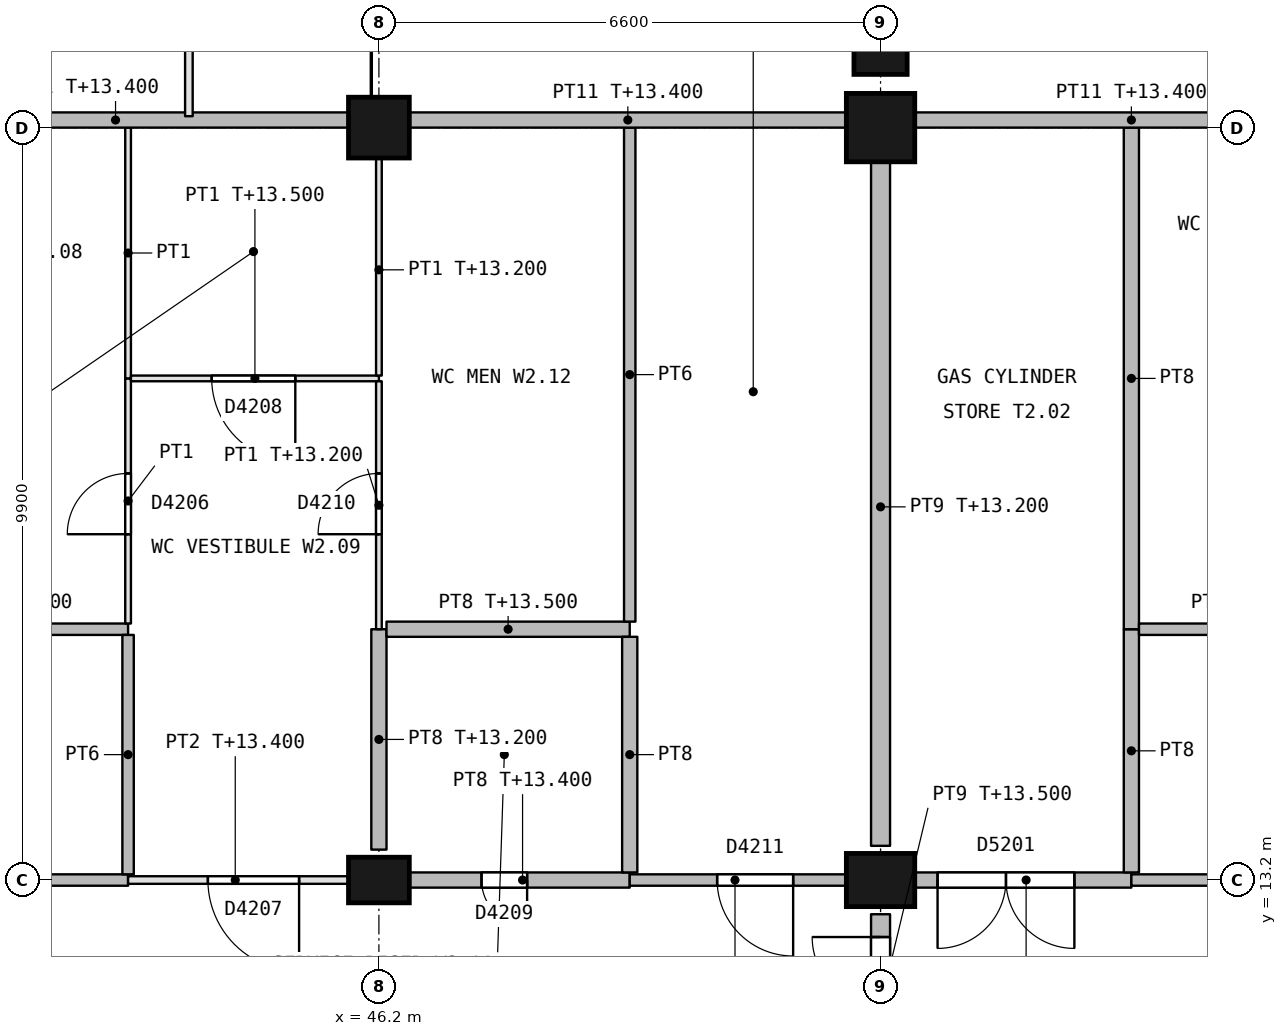
"""IFC4 building model, lengths in metres.
Left out: names, types, materials, properties, quantities, classifications, styles, units other than length and angle.
Written with IfcOpenShell. Run it as: python <this file> out.ifc"""

import sys

from ifc_helpers import new_model, si_unit, direction, frame, frame_2d, origin, origin_2d, place, context, subcontext, project, spatial, rectangle, extrude, element, fill, save


model = new_model("IFC4")
c1 = context("Model", 3, precision=1e-05, world=origin(), true_north=direction((0.0, 1.0)))
c2 = subcontext(c1, "Body", "Model", "MODEL_VIEW")
j1 = project(units=[si_unit("LENGTHUNIT", "METRE"), si_unit("PLANEANGLEUNIT", "RADIAN")], contexts=[c1])
p1 = place(None, origin())
s1 = spatial("IfcSite", under=j1, at=p1, CompositionType="ELEMENT")
p2 = place(p1, origin())
s2 = spatial("IfcBuilding", under=s1, at=p2, CompositionType="ELEMENT")
p3 = place(p2, frame((0.0, 0.0, 9.9)))
s3 = spatial("IfcBuildingStorey", under=s2, at=p3, CompositionType="ELEMENT", Elevation=9.9)
p4 = place(p3, frame((46.2, 13.2, 0.0), z_axis=(0.0, 0.0, 1.0), x_axis=(1.0, 0.0, 0.0)))
e1 = element("IfcColumn", 1, at=p4, inside=s3, PredefinedType="COLUMN", context=c2, shape_type="SweptSolid", body=[
    extrude(rectangle(XDim=0.8, YDim=0.6, at=origin_2d()), origin(), (0.0, 0.0, 1.0), 4.5),
])
p5 = place(p3, frame((46.2, 23.1, 0.0), z_axis=(0.0, 0.0, 1.0), x_axis=(1.0, 0.0, 0.0)))
e2 = element("IfcColumn", 2, at=p5, inside=s3, PredefinedType="COLUMN", context=c2, shape_type="SweptSolid", body=[
    extrude(rectangle(XDim=0.8, YDim=0.8, at=origin_2d()), origin(), (0.0, 0.0, 1.0), 4.5),
])
p6 = place(p3, frame((52.8, 13.2, 0.0), z_axis=(0.0, 0.0, 1.0), x_axis=(1.0, 0.0, 0.0)))
e3 = element("IfcColumn", 3, at=p6, inside=s3, PredefinedType="COLUMN", context=c2, shape_type="SweptSolid", body=[
    extrude(rectangle(XDim=0.9, YDim=0.7, at=origin_2d()), origin(), (0.0, 0.0, 1.0), 4.5),
])
p7 = place(p3, frame((52.8, 23.1, 0.0), z_axis=(0.0, 0.0, 1.0), x_axis=(1.0, 0.0, 0.0)))
e4 = element("IfcColumn", 4, at=p7, inside=s3, PredefinedType="COLUMN", context=c2, shape_type="SweptSolid", body=[
    extrude(rectangle(XDim=0.9, YDim=0.9, at=origin_2d()), origin(), (0.0, 0.0, 1.0), 4.5),
])
p8 = place(p3, frame((52.8, 24.15, 0.0), z_axis=(0.0, 0.0, 1.0), x_axis=(1.0, 0.0, 0.0)))
e5 = element("IfcColumn", 5, at=p8, inside=s3, PredefinedType="COLUMN", context=c2, shape_type="SweptSolid", body=[
    extrude(rectangle(XDim=0.7, YDim=0.7, at=origin_2d()), origin(), (0.0, 0.0, 1.0), 4.5),
])
p9 = place(p3, frame((42.9, 13.2, 0.0), z_axis=(0.0, 0.0, 1.0), x_axis=(-1.0, 0.0, 0.0)))
e6 = element("IfcWall", 6, at=p9, inside=s3, PredefinedType="PARTITIONING", context=c2, shape_type="SweptSolid", body=[
    extrude(rectangle(XDim=3.3, YDim=0.15, at=frame_2d((1.65, 0.0))), origin(), (0.0, 0.0, 1.0), 3.5),
])
p10 = place(p9, frame((1.2, 0.0, 0.0)))
e7 = element("IfcOpeningElement", 7, at=p10, cuts=e6, PredefinedType="OPENING", context=c2, shape_type="SweptSolid", body=[
    extrude(rectangle(XDim=0.9, YDim=2.1, at=frame_2d((0.45, 1.05))), frame((0.0, 0.085, 0.0), z_axis=(0.0, -1.0, 0.0), x_axis=(1.0, 0.0, 0.0)), (0.0, 0.0, 1.0), 0.17),
])
p11 = place(p3, frame((42.9, 13.2, 0.0), z_axis=(0.0, 0.0, 1.0), x_axis=(1.0, 0.0, 0.0)))
e8 = element("IfcWall", 8, at=p11, inside=s3, PredefinedType="PARTITIONING", context=c2, shape_type="SweptSolid", body=[
    extrude(rectangle(XDim=2.9, YDim=0.1, at=frame_2d((1.45, 0.0))), origin(), (0.0, 0.0, 1.0), 3.5),
])
p12 = place(p11, frame((1.05, 0.0, 0.0)))
e9 = element("IfcOpeningElement", 9, at=p12, cuts=e8, PredefinedType="OPENING", context=c2, shape_type="SweptSolid", body=[
    extrude(rectangle(XDim=1.2, YDim=2.1, at=frame_2d((0.6, 1.05))), frame((0.0, 0.06, 0.0), z_axis=(0.0, -1.0, 0.0), x_axis=(1.0, 0.0, 0.0)), (0.0, 0.0, 1.0), 0.12),
])
p13 = place(p3, frame((46.6, 13.2, 0.0), z_axis=(0.0, 0.0, 1.0), x_axis=(1.0, 0.0, 0.0)))
e10 = element("IfcWall", 10, at=p13, inside=s3, PredefinedType="PARTITIONING", context=c2, shape_type="SweptSolid", body=[
    extrude(rectangle(XDim=2.9, YDim=0.2, at=frame_2d((1.45, 0.0))), origin(), (0.0, 0.0, 1.0), 3.5),
])
p14 = place(p13, frame((0.95, 0.0, 0.0)))
e11 = element("IfcOpeningElement", 11, at=p14, cuts=e10, PredefinedType="OPENING", context=c2, shape_type="SweptSolid", body=[
    extrude(rectangle(XDim=0.6, YDim=2.1, at=frame_2d((0.3, 1.05))), frame((0.0, 0.11, 0.0), z_axis=(0.0, -1.0, 0.0), x_axis=(1.0, 0.0, 0.0)), (0.0, 0.0, 1.0), 0.22),
])
p15 = place(p3, frame((52.35, 13.2, 0.0), z_axis=(0.0, 0.0, 1.0), x_axis=(-1.0, 0.0, 0.0)))
e12 = element("IfcWall", 12, at=p15, inside=s3, PredefinedType="PARTITIONING", context=c2, shape_type="SweptSolid", body=[
    extrude(rectangle(XDim=2.85, YDim=0.15, at=frame_2d((1.425, 0.0))), origin(), (0.0, 0.0, 1.0), 3.5),
])
p16 = place(p15, frame((0.7, 0.0, 0.0)))
e13 = element("IfcOpeningElement", 13, at=p16, cuts=e12, PredefinedType="OPENING", context=c2, shape_type="SweptSolid", body=[
    extrude(rectangle(XDim=1.0, YDim=2.1, at=frame_2d((0.5, 1.05))), frame((0.0, 0.085, 0.0), z_axis=(0.0, -1.0, 0.0), x_axis=(1.0, 0.0, 0.0)), (0.0, 0.0, 1.0), 0.17),
])
p17 = place(p3, frame((52.8, 10.35, 0.0), z_axis=(0.0, 0.0, 1.0), x_axis=(0.0, 1.0, 0.0)))
e14 = element("IfcWall", 14, at=p17, inside=s3, PredefinedType="PARTITIONING", context=c2, shape_type="SweptSolid", body=[
    extrude(rectangle(XDim=2.4, YDim=0.25, at=frame_2d((1.2, 0.0))), origin(), (0.0, 0.0, 1.0), 3.6),
])
p18 = place(p17, frame((0.3, 0.0, 0.0)))
e15 = element("IfcOpeningElement", 15, at=p18, cuts=e14, PredefinedType="OPENING", context=c2, shape_type="SweptSolid", body=[
    extrude(rectangle(XDim=1.8, YDim=2.1, at=frame_2d((0.9, 1.05))), frame((0.0, 0.135, 0.0), z_axis=(0.0, -1.0, 0.0), x_axis=(1.0, 0.0, 0.0)), (0.0, 0.0, 1.0), 0.27),
])
p19 = place(p3, frame((42.9, 16.5, 0.0), z_axis=(0.0, 0.0, 1.0), x_axis=(-1.0, 0.0, 0.0)))
e16 = element("IfcWall", 16, at=p19, inside=s3, PredefinedType="PARTITIONING", context=c2, shape_type="SweptSolid", body=[
    extrude(rectangle(XDim=3.3, YDim=0.15, at=frame_2d((1.65, 0.0))), origin(), (0.0, 0.0, 1.0), 3.6),
])
p20 = place(p3, frame((42.9, 13.275, 0.0), z_axis=(0.0, 0.0, 1.0), x_axis=(0.0, 1.0, 0.0)))
e17 = element("IfcWall", 17, at=p20, inside=s3, PredefinedType="PARTITIONING", context=c2, shape_type="SweptSolid", body=[
    extrude(rectangle(XDim=3.15, YDim=0.15, at=frame_2d((1.575, 0.0))), origin(), (0.0, 0.0, 1.0), 4.2),
])
p21 = place(p3, frame((42.9, 16.575, 0.0), z_axis=(0.0, 0.0, 1.0), x_axis=(0.0, 1.0, 0.0)))
e18 = element("IfcWall", 18, at=p21, inside=s3, PredefinedType="PARTITIONING", context=c2, shape_type="SweptSolid", body=[
    extrude(rectangle(XDim=3.225, YDim=0.075, at=frame_2d((1.613, 0.0))), origin(), (0.0, 0.0, 1.0), 4.2),
])
p22 = place(p21, frame((1.175, 0.0, 0.0)))
e19 = element("IfcOpeningElement", 19, at=p22, cuts=e18, PredefinedType="OPENING", context=c2, shape_type="SweptSolid", body=[
    extrude(rectangle(XDim=0.8, YDim=2.1, at=frame_2d((0.4, 1.05))), frame((0.0, 0.047, 0.0), z_axis=(0.0, -1.0, 0.0), x_axis=(1.0, 0.0, 0.0)), (0.0, 0.0, 1.0), 0.095),
])
p23 = place(p3, frame((42.9, 19.8, 0.0), z_axis=(0.0, 0.0, 1.0), x_axis=(0.0, 1.0, 0.0)))
e20 = element("IfcWall", 20, at=p23, inside=s3, PredefinedType="PARTITIONING", context=c2, shape_type="SweptSolid", body=[
    extrude(rectangle(XDim=3.3, YDim=0.075, at=frame_2d((1.65, 0.0))), origin(), (0.0, 0.0, 1.0), 4.2),
])
p24 = place(p3, frame((42.938, 19.8, 0.0), z_axis=(0.0, 0.0, 1.0), x_axis=(1.0, 0.0, 0.0)))
e21 = element("IfcWall", 21, at=p24, inside=s3, PredefinedType="PARTITIONING", context=c2, shape_type="SweptSolid", body=[
    extrude(rectangle(XDim=3.262, YDim=0.075, at=frame_2d((1.631, 0.0))), origin(), (0.0, 0.0, 1.0), 3.6),
])
p25 = place(p24, frame((1.062, 0.0, 0.0)))
e22 = element("IfcOpeningElement", 22, at=p25, cuts=e21, PredefinedType="OPENING", context=c2, shape_type="SweptSolid", body=[
    extrude(rectangle(XDim=1.1, YDim=2.1, at=frame_2d((0.55, 1.05))), frame((0.0, 0.047, 0.0), z_axis=(0.0, -1.0, 0.0), x_axis=(1.0, 0.0, 0.0)), (0.0, 0.0, 1.0), 0.095),
])
p26 = place(p3, frame((46.2, 13.6, 0.0), z_axis=(0.0, 0.0, 1.0), x_axis=(0.0, 1.0, 0.0)))
e23 = element("IfcWall", 23, at=p26, inside=s3, PredefinedType="PARTITIONING", context=c2, shape_type="SweptSolid", body=[
    extrude(rectangle(XDim=2.9, YDim=0.2, at=frame_2d((1.45, 0.0))), origin(), (0.0, 0.0, 1.0), 3.3),
])
p27 = place(p3, frame((46.2, 19.762, 0.0), z_axis=(0.0, 0.0, 1.0), x_axis=(0.0, -1.0, 0.0)))
e24 = element("IfcWall", 24, at=p27, inside=s3, PredefinedType="PARTITIONING", context=c2, shape_type="SweptSolid", body=[
    extrude(rectangle(XDim=3.262, YDim=0.075, at=frame_2d((1.631, 0.0))), origin(), (0.0, 0.0, 1.0), 3.3),
])
p28 = place(p27, frame((1.212, 0.0, 0.0)))
e25 = element("IfcOpeningElement", 25, at=p28, cuts=e24, PredefinedType="OPENING", context=c2, shape_type="SweptSolid", body=[
    extrude(rectangle(XDim=0.8, YDim=2.1, at=frame_2d((0.4, 1.05))), frame((0.0, 0.047, 0.0), z_axis=(0.0, -1.0, 0.0), x_axis=(1.0, 0.0, 0.0)), (0.0, 0.0, 1.0), 0.095),
])
p29 = place(p3, frame((46.2, 19.837, 0.0), z_axis=(0.0, 0.0, 1.0), x_axis=(0.0, 1.0, 0.0)))
e26 = element("IfcWall", 26, at=p29, inside=s3, PredefinedType="PARTITIONING", context=c2, shape_type="SweptSolid", body=[
    extrude(rectangle(XDim=2.863, YDim=0.075, at=frame_2d((1.431, 0.0))), origin(), (0.0, 0.0, 1.0), 3.3),
])
p30 = place(p3, frame((49.5, 16.5, 0.0), z_axis=(0.0, 0.0, 1.0), x_axis=(-1.0, 0.0, 0.0)))
e27 = element("IfcWall", 27, at=p30, inside=s3, PredefinedType="PARTITIONING", context=c2, shape_type="SweptSolid", body=[
    extrude(rectangle(XDim=3.2, YDim=0.2, at=frame_2d((1.6, 0.0))), origin(), (0.0, 0.0, 1.0), 3.6),
])
p31 = place(p3, frame((49.5, 13.3, 0.0), z_axis=(0.0, 0.0, 1.0), x_axis=(0.0, 1.0, 0.0)))
e28 = element("IfcWall", 28, at=p31, inside=s3, PredefinedType="PARTITIONING", context=c2, shape_type="SweptSolid", body=[
    extrude(rectangle(XDim=3.1, YDim=0.2, at=frame_2d((1.55, 0.0))), origin(), (0.0, 0.0, 1.0), 4.2),
])
p32 = place(p3, frame((49.5, 16.6, 0.0), z_axis=(0.0, 0.0, 1.0), x_axis=(0.0, 1.0, 0.0)))
e29 = element("IfcWall", 29, at=p32, inside=s3, PredefinedType="PARTITIONING", context=c2, shape_type="SweptSolid", body=[
    extrude(rectangle(XDim=6.5, YDim=0.15, at=frame_2d((3.25, 0.0))), origin(), (0.0, 0.0, 1.0), 4.2),
])
p33 = place(p3, frame((52.8, 13.65, 0.0), z_axis=(0.0, 0.0, 1.0), x_axis=(0.0, 1.0, 0.0)))
e30 = element("IfcWall", 30, at=p33, inside=s3, PredefinedType="PARTITIONING", context=c2, shape_type="SweptSolid", body=[
    extrude(rectangle(XDim=9.0, YDim=0.25, at=frame_2d((4.5, 0.0))), origin(), (0.0, 0.0, 1.0), 3.3),
])
p34 = place(p3, frame((56.1, 13.2, 0.0), z_axis=(0.0, 0.0, 1.0), x_axis=(-1.0, 0.0, 0.0)))
e31 = element("IfcWall", 31, at=p34, inside=s3, PredefinedType="PARTITIONING", context=c2, shape_type="SweptSolid", body=[
    extrude(rectangle(XDim=2.85, YDim=0.2, at=frame_2d((1.425, 0.0))), origin(), (0.0, 0.0, 1.0), 3.5),
])
p35 = place(p34, frame((0.75, 0.0, 0.0)))
e32 = element("IfcOpeningElement", 32, at=p35, cuts=e31, PredefinedType="OPENING", context=c2, shape_type="SweptSolid", body=[
    extrude(rectangle(XDim=1.8, YDim=2.4, at=frame_2d((0.9, 1.2))), frame((0.0, 0.11, 0.0), z_axis=(0.0, -1.0, 0.0), x_axis=(1.0, 0.0, 0.0)), (0.0, 0.0, 1.0), 0.22),
])
p36 = place(p3, frame((58.95, 13.2, 0.0), z_axis=(0.0, 0.0, 1.0), x_axis=(-1.0, 0.0, 0.0)))
e33 = element("IfcWall", 33, at=p36, inside=s3, PredefinedType="PARTITIONING", context=c2, shape_type="SweptSolid", body=[
    extrude(rectangle(XDim=2.85, YDim=0.15, at=frame_2d((1.425, 0.0))), origin(), (0.0, 0.0, 1.0), 3.5),
])
p37 = place(p36, frame((0.75, 0.0, 0.0)))
e34 = element("IfcOpeningElement", 34, at=p37, cuts=e33, PredefinedType="OPENING", context=c2, shape_type="SweptSolid", body=[
    extrude(rectangle(XDim=0.9, YDim=2.1, at=frame_2d((0.45, 1.05))), frame((0.0, 0.085, 0.0), z_axis=(0.0, -1.0, 0.0), x_axis=(1.0, 0.0, 0.0)), (0.0, 0.0, 1.0), 0.17),
])
p38 = place(p3, frame((56.1, 13.3, 0.0), z_axis=(0.0, 0.0, 1.0), x_axis=(0.0, 1.0, 0.0)))
e35 = element("IfcWall", 35, at=p38, inside=s3, PredefinedType="PARTITIONING", context=c2, shape_type="SweptSolid", body=[
    extrude(rectangle(XDim=3.2, YDim=0.2, at=frame_2d((1.6, 0.0))), origin(), (0.0, 0.0, 1.0), 4.2),
])
p39 = place(p3, frame((56.1, 16.5, 0.0), z_axis=(0.0, 0.0, 1.0), x_axis=(0.0, 1.0, 0.0)))
e36 = element("IfcWall", 36, at=p39, inside=s3, PredefinedType="PARTITIONING", context=c2, shape_type="SweptSolid", body=[
    extrude(rectangle(XDim=6.6, YDim=0.2, at=frame_2d((3.3, 0.0))), origin(), (0.0, 0.0, 1.0), 4.2),
])
p40 = place(p3, frame((59.4, 16.5, 0.0), z_axis=(0.0, 0.0, 1.0), x_axis=(-1.0, 0.0, 0.0)))
e37 = element("IfcWall", 37, at=p40, inside=s3, PredefinedType="PARTITIONING", context=c2, shape_type="SweptSolid", body=[
    extrude(rectangle(XDim=3.2, YDim=0.15, at=frame_2d((1.6, 0.0))), origin(), (0.0, 0.0, 1.0), 3.6),
])
p41 = place(p3, frame((39.75, 23.2, 0.0), z_axis=(0.0, 0.0, 1.0), x_axis=(1.0, 0.0, 0.0)))
e38 = element("IfcWall", 38, at=p41, inside=s3, PredefinedType="PARTITIONING", context=c2, shape_type="SweptSolid", body=[
    extrude(rectangle(XDim=6.05, YDim=0.2, at=frame_2d((3.025, 0.0))), origin(), (0.0, 0.0, 1.0), 3.5),
])
p42 = place(p3, frame((46.6, 23.2, 0.0), z_axis=(0.0, 0.0, 1.0), x_axis=(1.0, 0.0, 0.0)))
e39 = element("IfcWall", 39, at=p42, inside=s3, PredefinedType="PARTITIONING", context=c2, shape_type="SweptSolid", body=[
    extrude(rectangle(XDim=5.75, YDim=0.2, at=frame_2d((2.875, 0.0))), origin(), (0.0, 0.0, 1.0), 3.5),
])
p43 = place(p3, frame((53.25, 23.2, 0.0), z_axis=(0.0, 0.0, 1.0), x_axis=(1.0, 0.0, 0.0)))
e40 = element("IfcWall", 40, at=p43, inside=s3, PredefinedType="PARTITIONING", context=c2, shape_type="SweptSolid", body=[
    extrude(rectangle(XDim=5.7, YDim=0.2, at=frame_2d((2.85, 0.0))), origin(), (0.0, 0.0, 1.0), 3.5),
])
p44 = place(p3, frame((43.7, 23.25, 0.0), z_axis=(0.0, 0.0, 1.0), x_axis=(0.0, 1.0, 0.0)))
e41 = element("IfcWall", 41, at=p44, inside=s3, PredefinedType="PARTITIONING", context=c2, shape_type="SweptSolid", body=[
    extrude(rectangle(XDim=13.05, YDim=0.1, at=frame_2d((6.525, 0.0))), origin(), (0.0, 0.0, 1.0), 3.5),
])
p45 = place(p44, frame((5.7, 0.0, 0.0)))
e42 = element("IfcOpeningElement", 42, at=p45, cuts=e41, PredefinedType="OPENING", context=c2, shape_type="SweptSolid", body=[
    extrude(rectangle(XDim=1.5, YDim=2.1, at=frame_2d((0.75, 1.05))), frame((0.0, 0.06, 0.0), z_axis=(0.0, -1.0, 0.0), x_axis=(1.0, 0.0, 0.0)), (0.0, 0.0, 1.0), 0.12),
])
p46 = place(p18, origin())
e43 = element("IfcDoor", 43, at=p46, inside=s3, OperationType="DOUBLE_DOOR_SINGLE_SWING", PredefinedType="DOOR", context=c2, shape_type="SweptSolid", body=[
    extrude(rectangle(XDim=1.8, YDim=2.1, at=frame_2d((0.9, 1.05))), frame((0.0, 0.03, 0.0), z_axis=(0.0, -1.0, 0.0), x_axis=(1.0, 0.0, 0.0)), (0.0, 0.0, 1.0), 0.06),
])
fill(e15, e43)
p47 = place(p22, origin())
e44 = element("IfcDoor", 44, at=p47, inside=s3, OperationType="SINGLE_SWING_LEFT", PredefinedType="DOOR", context=c2, shape_type="SweptSolid", body=[
    extrude(rectangle(XDim=0.8, YDim=2.1, at=frame_2d((0.4, 1.05))), frame((0.0, 0.022, 0.0), z_axis=(0.0, -1.0, 0.0), x_axis=(1.0, 0.0, 0.0)), (0.0, 0.0, 1.0), 0.044),
])
fill(e19, e44)
p48 = place(p12, origin())
e45 = element("IfcDoor", 45, at=p48, inside=s3, OperationType="SINGLE_SWING_RIGHT", PredefinedType="DOOR", context=c2, shape_type="SweptSolid", body=[
    extrude(rectangle(XDim=1.2, YDim=2.1, at=frame_2d((0.6, 1.05))), frame((0.0, 0.022, 0.0), z_axis=(0.0, -1.0, 0.0), x_axis=(1.0, 0.0, 0.0)), (0.0, 0.0, 1.0), 0.044),
])
fill(e9, e45)
p49 = place(p25, origin())
e46 = element("IfcDoor", 46, at=p49, inside=s3, OperationType="SINGLE_SWING_RIGHT", PredefinedType="DOOR", context=c2, shape_type="SweptSolid", body=[
    extrude(rectangle(XDim=1.1, YDim=2.1, at=frame_2d((0.55, 1.05))), frame((0.0, 0.022, 0.0), z_axis=(0.0, -1.0, 0.0), x_axis=(1.0, 0.0, 0.0)), (0.0, 0.0, 1.0), 0.044),
])
fill(e22, e46)
p50 = place(p14, origin())
e47 = element("IfcDoor", 47, at=p50, inside=s3, OperationType="SINGLE_SWING_RIGHT", PredefinedType="DOOR", context=c2, shape_type="SweptSolid", body=[
    extrude(rectangle(XDim=0.6, YDim=2.1, at=frame_2d((0.3, 1.05))), frame((0.0, 0.03, 0.0), z_axis=(0.0, -1.0, 0.0), x_axis=(1.0, 0.0, 0.0)), (0.0, 0.0, 1.0), 0.06),
])
fill(e11, e47)
p51 = place(p28, origin())
e48 = element("IfcDoor", 48, at=p51, inside=s3, OperationType="SINGLE_SWING_RIGHT", PredefinedType="DOOR", context=c2, shape_type="SweptSolid", body=[
    extrude(rectangle(XDim=0.8, YDim=2.1, at=frame_2d((0.4, 1.05))), frame((0.0, 0.022, 0.0), z_axis=(0.0, -1.0, 0.0), x_axis=(1.0, 0.0, 0.0)), (0.0, 0.0, 1.0), 0.044),
])
fill(e25, e48)
p52 = place(p16, origin())
e49 = element("IfcDoor", 49, at=p52, inside=s3, OperationType="SINGLE_SWING_LEFT", PredefinedType="DOOR", context=c2, shape_type="SweptSolid", body=[
    extrude(rectangle(XDim=1.0, YDim=2.1, at=frame_2d((0.5, 1.05))), frame((0.0, 0.027, 0.0), z_axis=(0.0, -1.0, 0.0), x_axis=(1.0, 0.0, 0.0)), (0.0, 0.0, 1.0), 0.054),
])
fill(e13, e49)
p53 = place(p35, origin())
e50 = element("IfcDoor", 50, at=p53, inside=s3, OperationType="DOUBLE_DOOR_SINGLE_SWING", PredefinedType="DOOR", context=c2, shape_type="SweptSolid", body=[
    extrude(rectangle(XDim=1.8, YDim=2.4, at=frame_2d((0.9, 1.2))), frame((0.0, 0.03, 0.0), z_axis=(0.0, -1.0, 0.0), x_axis=(1.0, 0.0, 0.0)), (0.0, 0.0, 1.0), 0.06),
])
fill(e32, e50)
save(model, sys.argv[1])
